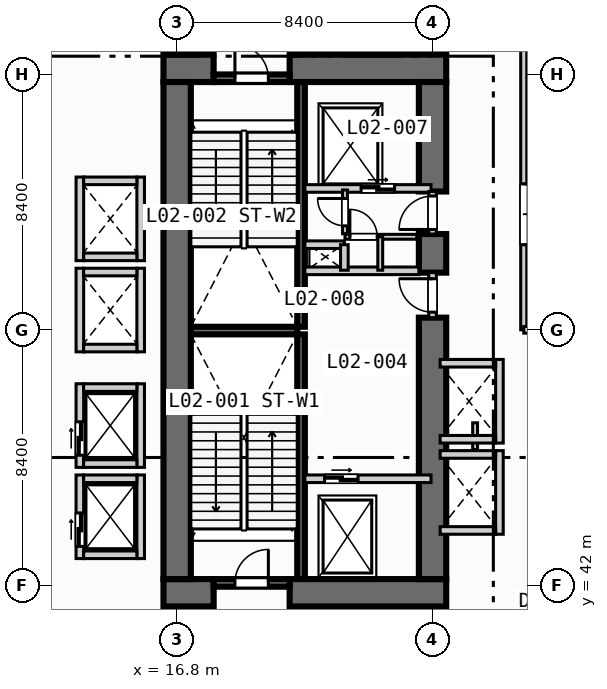
"""IFC4 building model, lengths in metres.
Left out: names, types, materials, properties, quantities, classifications, styles, units other than length and angle.
Written with IfcOpenShell. Run it as: python <this file> out.ifc"""

import sys

from ifc_helpers import new_model, si_unit, direction, frame, frame_2d, origin, place, context, subcontext, project, spatial, rectangle, extrude, element, fill, save


model = new_model("IFC4")
c1 = context("Model", 3, precision=1e-05, world=origin(), true_north=direction((0.0, 1.0)))
c2 = subcontext(c1, "Body", "Model", "MODEL_VIEW")
j1 = project(units=[si_unit("LENGTHUNIT", "METRE"), si_unit("PLANEANGLEUNIT", "RADIAN")], contexts=[c1])
p1 = place(None, origin())
s1 = spatial("IfcSite", under=j1, at=p1, CompositionType="ELEMENT")
p2 = place(p1, origin())
s2 = spatial("IfcBuilding", under=s1, at=p2, CompositionType="ELEMENT")
p3 = place(p2, frame((0.0, 0.0, 10.8)))
s3 = spatial("IfcBuildingStorey", under=s2, at=p3, CompositionType="ELEMENT", Elevation=10.8)
for number, where, z_axis, x_axis in (
    (1, (20.875, 42.2, 0.0), (0.0, 0.0, 1.0), (0.0, 1.0, 0.0)),
    (2, (20.875, 50.5, 0.0), (0.0, 0.0, 1.0), (0.0, 1.0, 0.0)),
):
    element("IfcWall", number, at=place(p3, frame(where, z_axis=z_axis, x_axis=x_axis)), inside=s3, PredefinedType="SOLIDWALL", context=c2, shape_type="SweptSolid", body=[
        extrude(rectangle(XDim=8.05, YDim=0.25, at=frame_2d((4.025, 0.0))), origin(), (0.0, 0.0, 1.0), 4.45),
    ])
p4 = place(p3, frame((17.25, 50.375, 0.0), z_axis=(0.0, 0.0, 1.0), x_axis=(1.0, 0.0, 0.0)))
e3 = element("IfcWall", 3, at=p4, inside=s3, PredefinedType="SOLIDWALL", context=c2, shape_type="SweptSolid", body=[
    extrude(rectangle(XDim=3.5, YDim=0.25, at=frame_2d((1.75, 0.0))), origin(), (0.0, 0.0, 1.0), 4.45),
])
p5 = place(p3, frame((16.35, 41.75, 0.0), z_axis=(0.0, 0.0, 1.0), x_axis=(1.0, 0.0, 0.0)))
e4 = element("IfcWall", 4, at=p5, inside=s3, PredefinedType="SHEAR", context=c2, shape_type="SweptSolid", body=[
    extrude(rectangle(XDim=1.65, YDim=0.9, at=frame_2d((0.825, 0.0))), origin(), (0.0, 0.0, 1.0), 4.45),
])
p6 = place(p3, frame((20.5, 41.75, 0.0), z_axis=(0.0, 0.0, 1.0), x_axis=(1.0, 0.0, 0.0)))
e5 = element("IfcWall", 5, at=p6, inside=s3, PredefinedType="SHEAR", context=c2, shape_type="SweptSolid", body=[
    extrude(rectangle(XDim=5.15, YDim=0.9, at=frame_2d((2.575, 0.0))), origin(), (0.0, 0.0, 1.0), 4.45),
])
p7 = place(p3, frame((16.35, 59.0, 0.0), z_axis=(0.0, 0.0, 1.0), x_axis=(1.0, 0.0, 0.0)))
e6 = element("IfcWall", 6, at=p7, inside=s3, PredefinedType="SHEAR", context=c2, shape_type="SweptSolid", body=[
    extrude(rectangle(XDim=1.65, YDim=0.9, at=frame_2d((0.825, 0.0))), origin(), (0.0, 0.0, 1.0), 4.45),
])
p8 = place(p3, frame((20.5, 59.0, 0.0), z_axis=(0.0, 0.0, 1.0), x_axis=(1.0, 0.0, 0.0)))
e7 = element("IfcWall", 7, at=p8, inside=s3, PredefinedType="SHEAR", context=c2, shape_type="SweptSolid", body=[
    extrude(rectangle(XDim=5.15, YDim=0.9, at=frame_2d((2.575, 0.0))), origin(), (0.0, 0.0, 1.0), 4.45),
])
p9 = place(p3, frame((16.8, 42.2, 0.0), z_axis=(0.0, 0.0, 1.0), x_axis=(0.0, 1.0, 0.0)))
e8 = element("IfcWall", 8, at=p9, inside=s3, PredefinedType="SHEAR", context=c2, shape_type="SweptSolid", body=[
    extrude(rectangle(XDim=16.35, YDim=0.9, at=frame_2d((8.175, 0.0))), origin(), (0.0, 0.0, 1.0), 4.45),
])
p10 = place(p3, frame((25.2, 42.2, 0.0), z_axis=(0.0, 0.0, 1.0), x_axis=(0.0, 1.0, 0.0)))
e9 = element("IfcWall", 9, at=p10, inside=s3, PredefinedType="SHEAR", context=c2, shape_type="SweptSolid", body=[
    extrude(rectangle(XDim=8.6, YDim=0.9, at=frame_2d((4.3, 0.0))), origin(), (0.0, 0.0, 1.0), 4.45),
])
p11 = place(p3, frame((25.2, 52.28, 0.0), z_axis=(0.0, 0.0, 1.0), x_axis=(0.0, 1.0, 0.0)))
e10 = element("IfcWall", 10, at=p11, inside=s3, PredefinedType="SHEAR", context=c2, shape_type="SweptSolid", body=[
    extrude(rectangle(XDim=1.27, YDim=0.9, at=frame_2d((0.635, 0.0))), origin(), (0.0, 0.0, 1.0), 4.45),
])
p12 = place(p3, frame((25.2, 54.95, 0.0), z_axis=(0.0, 0.0, 1.0), x_axis=(0.0, 1.0, 0.0)))
e11 = element("IfcWall", 11, at=p12, inside=s3, PredefinedType="SHEAR", context=c2, shape_type="SweptSolid", body=[
    extrude(rectangle(XDim=3.6, YDim=0.9, at=frame_2d((1.8, 0.0))), origin(), (0.0, 0.0, 1.0), 4.45),
])
p13 = place(p3, frame((18.0, 42.075, 0.0), z_axis=(0.0, 0.0, 1.0), x_axis=(1.0, 0.0, 0.0)))
e12 = element("IfcWall", 12, at=p13, inside=s3, PredefinedType="SOLIDWALL", context=c2, shape_type="SweptSolid", body=[
    extrude(rectangle(XDim=2.5, YDim=0.25, at=frame_2d((1.25, 0.0))), origin(), (0.0, 0.0, 1.0), 4.45),
])
p14 = place(p13, frame((0.7, 0.0, 0.0)))
e13 = element("IfcOpeningElement", 13, at=p14, cuts=e12, PredefinedType="OPENING", context=c2, shape_type="SweptSolid", body=[
    extrude(rectangle(XDim=1.1, YDim=2.15, at=frame_2d((0.55, 1.075))), frame((0.0, 0.135, 0.0), z_axis=(0.0, -1.0, 0.0), x_axis=(1.0, 0.0, 0.0)), (0.0, 0.0, 1.0), 0.27),
])
p15 = place(p3, frame((18.0, 58.675, 0.0), z_axis=(0.0, 0.0, 1.0), x_axis=(1.0, 0.0, 0.0)))
e14 = element("IfcWall", 14, at=p15, inside=s3, PredefinedType="SOLIDWALL", context=c2, shape_type="SweptSolid", body=[
    extrude(rectangle(XDim=2.5, YDim=0.25, at=frame_2d((1.25, 0.0))), origin(), (0.0, 0.0, 1.0), 4.45),
])
p16 = place(p15, frame((0.7, 0.0, 0.0)))
e15 = element("IfcOpeningElement", 15, at=p16, cuts=e14, PredefinedType="OPENING", context=c2, shape_type="SweptSolid", body=[
    extrude(rectangle(XDim=1.1, YDim=2.15, at=frame_2d((0.55, 1.075))), frame((0.0, 0.135, 0.0), z_axis=(0.0, -1.0, 0.0), x_axis=(1.0, 0.0, 0.0)), (0.0, 0.0, 1.0), 0.27),
])
p17 = place(p3, frame((21.0, 45.5, 0.0), z_axis=(0.0, 0.0, 1.0), x_axis=(1.0, 0.0, 0.0)))
e16 = element("IfcWall", 16, at=p17, inside=s3, PredefinedType="SOLIDWALL", context=c2, shape_type="SweptSolid", body=[
    extrude(rectangle(XDim=4.15, YDim=0.25, at=frame_2d((2.075, 0.0))), origin(), (0.0, 0.0, 1.0), 4.45),
])
p18 = place(p17, frame((0.65, 0.0, 0.0)))
e17 = element("IfcOpeningElement", 17, at=p18, cuts=e16, PredefinedType="OPENING", context=c2, shape_type="SweptSolid", body=[
    extrude(rectangle(XDim=1.1, YDim=2.15, at=frame_2d((0.55, 1.075))), frame((0.0, 0.135, 0.0), z_axis=(0.0, -1.0, 0.0), x_axis=(1.0, 0.0, 0.0)), (0.0, 0.0, 1.0), 0.27),
])
p19 = place(p3, frame((25.2, 50.8, 0.0), z_axis=(0.0, 0.0, 1.0), x_axis=(0.0, 1.0, 0.0)))
e18 = element("IfcWall", 18, at=p19, inside=s3, PredefinedType="SOLIDWALL", context=c2, shape_type="SweptSolid", body=[
    extrude(rectangle(XDim=1.48, YDim=0.25, at=frame_2d((0.74, 0.0))), origin(), (0.0, 0.0, 1.0), 4.45),
])
p20 = place(p19, frame((0.18, 0.0, 0.0)))
e19 = element("IfcOpeningElement", 19, at=p20, cuts=e18, PredefinedType="OPENING", context=c2, shape_type="SweptSolid", body=[
    extrude(rectangle(XDim=1.1, YDim=2.15, at=frame_2d((0.55, 1.075))), frame((0.0, 0.135, 0.0), z_axis=(0.0, -1.0, 0.0), x_axis=(1.0, 0.0, 0.0)), (0.0, 0.0, 1.0), 0.27),
])
p21 = place(p3, frame((21.0, 52.34, 0.0), z_axis=(0.0, 0.0, 1.0), x_axis=(1.0, 0.0, 0.0)))
e20 = element("IfcWall", 20, at=p21, inside=s3, PredefinedType="SOLIDWALL", context=c2, shape_type="SweptSolid", body=[
    extrude(rectangle(XDim=3.75, YDim=0.25, at=frame_2d((1.875, 0.0))), origin(), (0.0, 0.0, 1.0), 4.45),
])
p22 = place(p3, frame((21.0, 55.05, 0.0), z_axis=(0.0, 0.0, 1.0), x_axis=(1.0, 0.0, 0.0)))
e21 = element("IfcWall", 21, at=p22, inside=s3, PredefinedType="SOLIDWALL", context=c2, shape_type="SweptSolid", body=[
    extrude(rectangle(XDim=4.15, YDim=0.25, at=frame_2d((2.075, 0.0))), origin(), (0.0, 0.0, 1.0), 4.45),
])
p23 = place(p22, frame((1.85, 0.0, 0.0)))
e22 = element("IfcOpeningElement", 22, at=p23, cuts=e21, PredefinedType="OPENING", context=c2, shape_type="SweptSolid", body=[
    extrude(rectangle(XDim=1.1, YDim=2.15, at=frame_2d((0.55, 1.075))), frame((0.0, 0.135, 0.0), z_axis=(0.0, -1.0, 0.0), x_axis=(1.0, 0.0, 0.0)), (0.0, 0.0, 1.0), 0.27),
])
p24 = place(p3, frame((25.2, 53.55, 0.0), z_axis=(0.0, 0.0, 1.0), x_axis=(0.0, 1.0, 0.0)))
e23 = element("IfcWall", 23, at=p24, inside=s3, PredefinedType="SOLIDWALL", context=c2, shape_type="SweptSolid", body=[
    extrude(rectangle(XDim=1.4, YDim=0.25, at=frame_2d((0.7, 0.0))), origin(), (0.0, 0.0, 1.0), 4.45),
])
p25 = place(p24, frame((0.15, 0.0, 0.0)))
e24 = element("IfcOpeningElement", 24, at=p25, cuts=e23, PredefinedType="OPENING", context=c2, shape_type="SweptSolid", body=[
    extrude(rectangle(XDim=1.1, YDim=2.15, at=frame_2d((0.55, 1.075))), frame((0.0, 0.135, 0.0), z_axis=(0.0, -1.0, 0.0), x_axis=(1.0, 0.0, 0.0)), (0.0, 0.0, 1.0), 0.27),
])
p26 = place(p3, frame((21.0, 53.2, 0.0), z_axis=(0.0, 0.0, 1.0), x_axis=(1.0, 0.0, 0.0)))
e25 = element("IfcWall", 25, at=p26, inside=s3, PredefinedType="SOLIDWALL", context=c2, shape_type="SweptSolid", body=[
    extrude(rectangle(XDim=1.3, YDim=0.25, at=frame_2d((0.65, 0.0))), origin(), (0.0, 0.0, 1.0), 4.45),
])
p27 = place(p3, frame((22.3, 52.36, 0.0), z_axis=(0.0, 0.0, 1.0), x_axis=(0.0, 1.0, 0.0)))
e26 = element("IfcWall", 26, at=p27, inside=s3, PredefinedType="SOLIDWALL", context=c2, shape_type="SweptSolid", body=[
    extrude(rectangle(XDim=0.84, YDim=0.25, at=frame_2d((0.42, 0.0))), origin(), (0.0, 0.0, 1.0), 4.45),
])
p28 = place(p3, frame((22.32, 53.56, 0.0), z_axis=(0.0, 0.0, 1.0), x_axis=(0.0, 1.0, 0.0)))
e27 = element("IfcWall", 27, at=p28, inside=s3, PredefinedType="PARTITIONING", context=c2, shape_type="SweptSolid", body=[
    extrude(rectangle(XDim=1.44, YDim=0.16, at=frame_2d((0.72, 0.0))), origin(), (0.0, 0.0, 1.0), 4.45),
])
p29 = place(p28, frame((0.26, 0.0, 0.0)))
e28 = element("IfcOpeningElement", 28, at=p29, cuts=e27, PredefinedType="OPENING", context=c2, shape_type="SweptSolid", body=[
    extrude(rectangle(XDim=0.9, YDim=2.1, at=frame_2d((0.45, 1.05))), frame((0.0, 0.09, 0.0), z_axis=(0.0, -1.0, 0.0), x_axis=(1.0, 0.0, 0.0)), (0.0, 0.0, 1.0), 0.18),
])
p30 = place(p3, frame((22.32, 53.46, 0.0), z_axis=(0.0, 0.0, 1.0), x_axis=(1.0, 0.0, 0.0)))
e29 = element("IfcWall", 29, at=p30, inside=s3, PredefinedType="PARTITIONING", context=c2, shape_type="SweptSolid", body=[
    extrude(rectangle(XDim=2.36, YDim=0.16, at=frame_2d((1.18, 0.0))), origin(), (0.0, 0.0, 1.0), 4.45),
])
p31 = place(p30, frame((0.16, 0.0, 0.0)))
e30 = element("IfcOpeningElement", 30, at=p31, cuts=e29, PredefinedType="OPENING", context=c2, shape_type="SweptSolid", body=[
    extrude(rectangle(XDim=0.9, YDim=2.1, at=frame_2d((0.45, 1.05))), frame((0.0, 0.09, 0.0), z_axis=(0.0, -1.0, 0.0), x_axis=(1.0, 0.0, 0.0)), (0.0, 0.0, 1.0), 0.18),
])
p32 = place(p3, frame((23.48, 52.36, 0.0), z_axis=(0.0, 0.0, 1.0), x_axis=(0.0, 1.0, 0.0)))
e31 = element("IfcWall", 31, at=p32, inside=s3, PredefinedType="PARTITIONING", context=c2, shape_type="SweptSolid", body=[
    extrude(rectangle(XDim=1.1, YDim=0.16, at=frame_2d((0.55, 0.0))), origin(), (0.0, 0.0, 1.0), 4.45),
])
p33 = place(p3, frame((13.6, 42.875, 0.0), z_axis=(0.0, 0.0, 1.0), x_axis=(0.0, 1.0, 0.0)))
e32 = element("IfcWall", 32, at=p33, inside=s3, PredefinedType="SOLIDWALL", context=c2, shape_type="SweptSolid", body=[
    extrude(rectangle(XDim=2.75, YDim=0.25, at=frame_2d((1.375, 0.0))), origin(), (0.0, 0.0, 1.0), 4.45),
])
p34 = place(p33, frame((0.4, 0.0, 0.0)))
e33 = element("IfcOpeningElement", 33, at=p34, cuts=e32, PredefinedType="OPENING", context=c2, shape_type="SweptSolid", body=[
    extrude(rectangle(XDim=1.1, YDim=2.15, at=frame_2d((0.55, 1.075))), frame((0.0, 0.135, 0.0), z_axis=(0.0, -1.0, 0.0), x_axis=(1.0, 0.0, 0.0)), (0.0, 0.0, 1.0), 0.27),
])
p35 = place(p3, frame((15.6, 42.875, 0.0), z_axis=(0.0, 0.0, 1.0), x_axis=(0.0, 1.0, 0.0)))
e34 = element("IfcWall", 34, at=p35, inside=s3, PredefinedType="SOLIDWALL", context=c2, shape_type="SweptSolid", body=[
    extrude(rectangle(XDim=2.75, YDim=0.25, at=frame_2d((1.375, 0.0))), origin(), (0.0, 0.0, 1.0), 4.45),
])
for number, where, z_axis, x_axis in (
    (35, (13.725, 43.0, 0.0), (0.0, 0.0, 1.0), (1.0, 0.0, 0.0)),
    (36, (13.725, 45.5, 0.0), (0.0, 0.0, 1.0), (1.0, 0.0, 0.0)),
):
    element("IfcWall", number, at=place(p3, frame(where, z_axis=z_axis, x_axis=x_axis)), inside=s3, PredefinedType="SOLIDWALL", context=c2, shape_type="SweptSolid", body=[
        extrude(rectangle(XDim=1.75, YDim=0.25, at=frame_2d((0.875, 0.0))), origin(), (0.0, 0.0, 1.0), 4.45),
    ])
p36 = place(p3, frame((13.6, 45.875, 0.0), z_axis=(0.0, 0.0, 1.0), x_axis=(0.0, 1.0, 0.0)))
e37 = element("IfcWall", 37, at=p36, inside=s3, PredefinedType="SOLIDWALL", context=c2, shape_type="SweptSolid", body=[
    extrude(rectangle(XDim=2.75, YDim=0.25, at=frame_2d((1.375, 0.0))), origin(), (0.0, 0.0, 1.0), 4.45),
])
p37 = place(p36, frame((0.4, 0.0, 0.0)))
e38 = element("IfcOpeningElement", 38, at=p37, cuts=e37, PredefinedType="OPENING", context=c2, shape_type="SweptSolid", body=[
    extrude(rectangle(XDim=1.1, YDim=2.15, at=frame_2d((0.55, 1.075))), frame((0.0, 0.135, 0.0), z_axis=(0.0, -1.0, 0.0), x_axis=(1.0, 0.0, 0.0)), (0.0, 0.0, 1.0), 0.27),
])
p38 = place(p3, frame((15.6, 45.875, 0.0), z_axis=(0.0, 0.0, 1.0), x_axis=(0.0, 1.0, 0.0)))
e39 = element("IfcWall", 39, at=p38, inside=s3, PredefinedType="SOLIDWALL", context=c2, shape_type="SweptSolid", body=[
    extrude(rectangle(XDim=2.75, YDim=0.25, at=frame_2d((1.375, 0.0))), origin(), (0.0, 0.0, 1.0), 4.45),
])
for number, where, z_axis, x_axis in (
    (40, (13.725, 46.0, 0.0), (0.0, 0.0, 1.0), (1.0, 0.0, 0.0)),
    (41, (13.725, 48.5, 0.0), (0.0, 0.0, 1.0), (1.0, 0.0, 0.0)),
):
    element("IfcWall", number, at=place(p3, frame(where, z_axis=z_axis, x_axis=x_axis)), inside=s3, PredefinedType="SOLIDWALL", context=c2, shape_type="SweptSolid", body=[
        extrude(rectangle(XDim=1.75, YDim=0.25, at=frame_2d((0.875, 0.0))), origin(), (0.0, 0.0, 1.0), 4.45),
    ])
for number, where, z_axis, x_axis in (
    (42, (13.6, 49.675, 0.0), (0.0, 0.0, 1.0), (0.0, 1.0, 0.0)),
    (43, (15.6, 49.675, 0.0), (0.0, 0.0, 1.0), (0.0, 1.0, 0.0)),
):
    element("IfcWall", number, at=place(p3, frame(where, z_axis=z_axis, x_axis=x_axis)), inside=s3, PredefinedType="SOLIDWALL", context=c2, shape_type="SweptSolid", body=[
        extrude(rectangle(XDim=2.75, YDim=0.25, at=frame_2d((1.375, 0.0))), origin(), (0.0, 0.0, 1.0), 4.45),
    ])
for number, where, z_axis, x_axis in (
    (44, (13.725, 49.8, 0.0), (0.0, 0.0, 1.0), (1.0, 0.0, 0.0)),
    (45, (13.725, 52.3, 0.0), (0.0, 0.0, 1.0), (1.0, 0.0, 0.0)),
):
    element("IfcWall", number, at=place(p3, frame(where, z_axis=z_axis, x_axis=x_axis)), inside=s3, PredefinedType="SOLIDWALL", context=c2, shape_type="SweptSolid", body=[
        extrude(rectangle(XDim=1.75, YDim=0.25, at=frame_2d((0.875, 0.0))), origin(), (0.0, 0.0, 1.0), 4.45),
    ])
for number, where, z_axis, x_axis in (
    (46, (13.6, 52.675, 0.0), (0.0, 0.0, 1.0), (0.0, 1.0, 0.0)),
    (47, (15.6, 52.675, 0.0), (0.0, 0.0, 1.0), (0.0, 1.0, 0.0)),
):
    element("IfcWall", number, at=place(p3, frame(where, z_axis=z_axis, x_axis=x_axis)), inside=s3, PredefinedType="SOLIDWALL", context=c2, shape_type="SweptSolid", body=[
        extrude(rectangle(XDim=2.75, YDim=0.25, at=frame_2d((1.375, 0.0))), origin(), (0.0, 0.0, 1.0), 4.45),
    ])
for number, where, z_axis, x_axis in (
    (48, (13.725, 52.8, 0.0), (0.0, 0.0, 1.0), (1.0, 0.0, 0.0)),
    (49, (13.725, 55.3, 0.0), (0.0, 0.0, 1.0), (1.0, 0.0, 0.0)),
):
    element("IfcWall", number, at=place(p3, frame(where, z_axis=z_axis, x_axis=x_axis)), inside=s3, PredefinedType="SOLIDWALL", context=c2, shape_type="SweptSolid", body=[
        extrude(rectangle(XDim=1.75, YDim=0.25, at=frame_2d((0.875, 0.0))), origin(), (0.0, 0.0, 1.0), 4.45),
    ])
p39 = place(p3, frame((27.4, 43.675, 0.0), z_axis=(0.0, 0.0, 1.0), x_axis=(0.0, 1.0, 0.0)))
e50 = element("IfcWall", 50, at=p39, inside=s3, PredefinedType="SOLIDWALL", context=c2, shape_type="SweptSolid", body=[
    extrude(rectangle(XDim=2.75, YDim=0.25, at=frame_2d((1.375, 0.0))), origin(), (0.0, 0.0, 1.0), 4.45),
])
for number, where, z_axis, x_axis in (
    (51, (25.45, 43.8, 0.0), (0.0, 0.0, 1.0), (1.0, 0.0, 0.0)),
    (52, (25.45, 46.3, 0.0), (0.0, 0.0, 1.0), (1.0, 0.0, 0.0)),
):
    element("IfcWall", number, at=place(p3, frame(where, z_axis=z_axis, x_axis=x_axis)), inside=s3, PredefinedType="SOLIDWALL", context=c2, shape_type="SweptSolid", body=[
        extrude(rectangle(XDim=1.825, YDim=0.25, at=frame_2d((0.913, 0.0))), origin(), (0.0, 0.0, 1.0), 4.45),
    ])
p40 = place(p3, frame((26.6, 46.46, 0.0), z_axis=(0.0, 0.0, 1.0), x_axis=(0.0, 1.0, 0.0)))
e53 = element("IfcWall", 53, at=p40, inside=s3, PredefinedType="PARTITIONING", context=c2, shape_type="SweptSolid", body=[
    extrude(rectangle(XDim=0.88, YDim=0.16, at=frame_2d((0.44, 0.0))), origin(), (0.0, 0.0, 1.0), 4.45),
])
p41 = place(p3, frame((27.4, 46.675, 0.0), z_axis=(0.0, 0.0, 1.0), x_axis=(0.0, 1.0, 0.0)))
e54 = element("IfcWall", 54, at=p41, inside=s3, PredefinedType="SOLIDWALL", context=c2, shape_type="SweptSolid", body=[
    extrude(rectangle(XDim=2.75, YDim=0.25, at=frame_2d((1.375, 0.0))), origin(), (0.0, 0.0, 1.0), 4.45),
])
for number, where, z_axis, x_axis in (
    (55, (25.45, 46.8, 0.0), (0.0, 0.0, 1.0), (1.0, 0.0, 0.0)),
    (56, (25.45, 49.3, 0.0), (0.0, 0.0, 1.0), (1.0, 0.0, 0.0)),
):
    element("IfcWall", number, at=place(p3, frame(where, z_axis=z_axis, x_axis=x_axis)), inside=s3, PredefinedType="SOLIDWALL", context=c2, shape_type="SweptSolid", body=[
        extrude(rectangle(XDim=1.825, YDim=0.25, at=frame_2d((0.913, 0.0))), origin(), (0.0, 0.0, 1.0), 4.45),
    ])
p42 = place(p3, frame((28.2, 50.4, 0.0), z_axis=(0.0, 0.0, 1.0), x_axis=(0.0, 1.0, 0.0)))
e57 = element("IfcWall", 57, at=p42, inside=s3, PredefinedType="PARTITIONING", context=c2, shape_type="SweptSolid", body=[
    extrude(rectangle(XDim=38.6, YDim=0.2, at=frame_2d((19.3, 0.0))), origin(), (0.0, 0.0, 1.0), 4.45),
])
p43 = place(p42, frame((2.8, 0.0, 0.0)))
e58 = element("IfcOpeningElement", 58, at=p43, cuts=e57, PredefinedType="OPENING", context=c2, shape_type="SweptSolid", body=[
    extrude(rectangle(XDim=2.0, YDim=2.15, at=frame_2d((1.0, 1.075))), frame((0.0, 0.11, 0.0), z_axis=(0.0, -1.0, 0.0), x_axis=(1.0, 0.0, 0.0)), (0.0, 0.0, 1.0), 0.22),
])
p44 = place(p42, frame((22.4, 0.0, 0.0)))
e59 = element("IfcOpeningElement", 59, at=p44, cuts=e57, PredefinedType="OPENING", context=c2, shape_type="SweptSolid", body=[
    extrude(rectangle(XDim=2.0, YDim=2.15, at=frame_2d((1.0, 1.075))), frame((0.0, 0.11, 0.0), z_axis=(0.0, -1.0, 0.0), x_axis=(1.0, 0.0, 0.0)), (0.0, 0.0, 1.0), 0.22),
])
p45 = place(p3, frame((28.2, 50.4, 0.0), z_axis=(0.0, 0.0, 1.0), x_axis=(1.0, 0.0, 0.0)))
e60 = element("IfcWall", 60, at=p45, inside=s3, PredefinedType="PARTITIONING", context=c2, shape_type="SweptSolid", body=[
    extrude(rectangle(XDim=13.4, YDim=0.22, at=frame_2d((6.7, 0.0))), origin(), (0.0, 0.0, 1.0), 3.6),
])
p46 = place(p14, origin())
e61 = element("IfcDoor", 61, at=p46, inside=s3, OperationType="SINGLE_SWING_RIGHT", PredefinedType="DOOR", context=c2, shape_type="SweptSolid", body=[
    extrude(rectangle(XDim=1.1, YDim=2.15, at=frame_2d((0.55, 1.075))), frame((0.0, 0.025, 0.0), z_axis=(0.0, -1.0, 0.0), x_axis=(1.0, 0.0, 0.0)), (0.0, 0.0, 1.0), 0.05),
])
fill(e13, e61)
p47 = place(p16, origin())
e62 = element("IfcDoor", 62, at=p47, inside=s3, OperationType="SINGLE_SWING_LEFT", PredefinedType="DOOR", context=c2, shape_type="SweptSolid", body=[
    extrude(rectangle(XDim=1.1, YDim=2.15, at=frame_2d((0.55, 1.075))), frame((0.0, 0.025, 0.0), z_axis=(0.0, -1.0, 0.0), x_axis=(1.0, 0.0, 0.0)), (0.0, 0.0, 1.0), 0.05),
])
fill(e15, e62)
p48 = place(p18, origin())
e63 = element("IfcDoor", 63, at=p48, inside=s3, OperationType="SLIDING_TO_LEFT", PredefinedType="DOOR", context=c2, shape_type="SweptSolid", body=[
    extrude(rectangle(XDim=1.1, YDim=2.15, at=frame_2d((0.55, 1.075))), frame((0.0, 0.025, 0.0), z_axis=(0.0, -1.0, 0.0), x_axis=(1.0, 0.0, 0.0)), (0.0, 0.0, 1.0), 0.05),
])
fill(e17, e63)
p49 = place(p20, origin())
e64 = element("IfcDoor", 64, at=p49, inside=s3, OperationType="SINGLE_SWING_RIGHT", PredefinedType="DOOR", context=c2, shape_type="SweptSolid", body=[
    extrude(rectangle(XDim=1.1, YDim=2.15, at=frame_2d((0.55, 1.075))), frame((0.0, 0.025, 0.0), z_axis=(0.0, -1.0, 0.0), x_axis=(1.0, 0.0, 0.0)), (0.0, 0.0, 1.0), 0.05),
])
fill(e19, e64)
p50 = place(p23, origin())
e65 = element("IfcDoor", 65, at=p50, inside=s3, OperationType="SLIDING_TO_LEFT", PredefinedType="DOOR", context=c2, shape_type="SweptSolid", body=[
    extrude(rectangle(XDim=1.1, YDim=2.15, at=frame_2d((0.55, 1.075))), frame((0.0, 0.025, 0.0), z_axis=(0.0, -1.0, 0.0), x_axis=(1.0, 0.0, 0.0)), (0.0, 0.0, 1.0), 0.05),
])
fill(e22, e65)
p51 = place(p25, origin())
e66 = element("IfcDoor", 66, at=p51, inside=s3, OperationType="SINGLE_SWING_LEFT", PredefinedType="DOOR", context=c2, shape_type="SweptSolid", body=[
    extrude(rectangle(XDim=1.1, YDim=2.15, at=frame_2d((0.55, 1.075))), frame((0.0, 0.025, 0.0), z_axis=(0.0, -1.0, 0.0), x_axis=(1.0, 0.0, 0.0)), (0.0, 0.0, 1.0), 0.05),
])
fill(e24, e66)
p52 = place(p29, origin())
e67 = element("IfcDoor", 67, at=p52, inside=s3, OperationType="SINGLE_SWING_RIGHT", PredefinedType="DOOR", context=c2, shape_type="SweptSolid", body=[
    extrude(rectangle(XDim=0.9, YDim=2.1, at=frame_2d((0.45, 1.05))), frame((0.0, 0.025, 0.0), z_axis=(0.0, -1.0, 0.0), x_axis=(1.0, 0.0, 0.0)), (0.0, 0.0, 1.0), 0.05),
])
fill(e28, e67)
p53 = place(p31, origin())
e68 = element("IfcDoor", 68, at=p53, inside=s3, OperationType="SINGLE_SWING_LEFT", PredefinedType="DOOR", context=c2, shape_type="SweptSolid", body=[
    extrude(rectangle(XDim=0.9, YDim=2.1, at=frame_2d((0.45, 1.05))), frame((0.0, 0.025, 0.0), z_axis=(0.0, -1.0, 0.0), x_axis=(1.0, 0.0, 0.0)), (0.0, 0.0, 1.0), 0.05),
])
fill(e30, e68)
p54 = place(p34, origin())
e69 = element("IfcDoor", 69, at=p54, inside=s3, OperationType="SLIDING_TO_LEFT", PredefinedType="DOOR", context=c2, shape_type="SweptSolid", body=[
    extrude(rectangle(XDim=1.1, YDim=2.15, at=frame_2d((0.55, 1.075))), frame((0.0, 0.025, 0.0), z_axis=(0.0, -1.0, 0.0), x_axis=(1.0, 0.0, 0.0)), (0.0, 0.0, 1.0), 0.05),
])
fill(e33, e69)
p55 = place(p37, origin())
e70 = element("IfcDoor", 70, at=p55, inside=s3, OperationType="SLIDING_TO_LEFT", PredefinedType="DOOR", context=c2, shape_type="SweptSolid", body=[
    extrude(rectangle(XDim=1.1, YDim=2.15, at=frame_2d((0.55, 1.075))), frame((0.0, 0.025, 0.0), z_axis=(0.0, -1.0, 0.0), x_axis=(1.0, 0.0, 0.0)), (0.0, 0.0, 1.0), 0.05),
])
fill(e38, e70)
p56 = place(p43, origin())
e71 = element("IfcDoor", 71, at=p56, inside=s3, OperationType="SINGLE_SWING_RIGHT", PredefinedType="DOOR", context=c2, shape_type="SweptSolid", body=[
    extrude(rectangle(XDim=2.0, YDim=2.15, at=frame_2d((1.0, 1.075))), frame((0.0, 0.025, 0.0), z_axis=(0.0, -1.0, 0.0), x_axis=(1.0, 0.0, 0.0)), (0.0, 0.0, 1.0), 0.05),
])
fill(e58, e71)
save(model, sys.argv[1])
